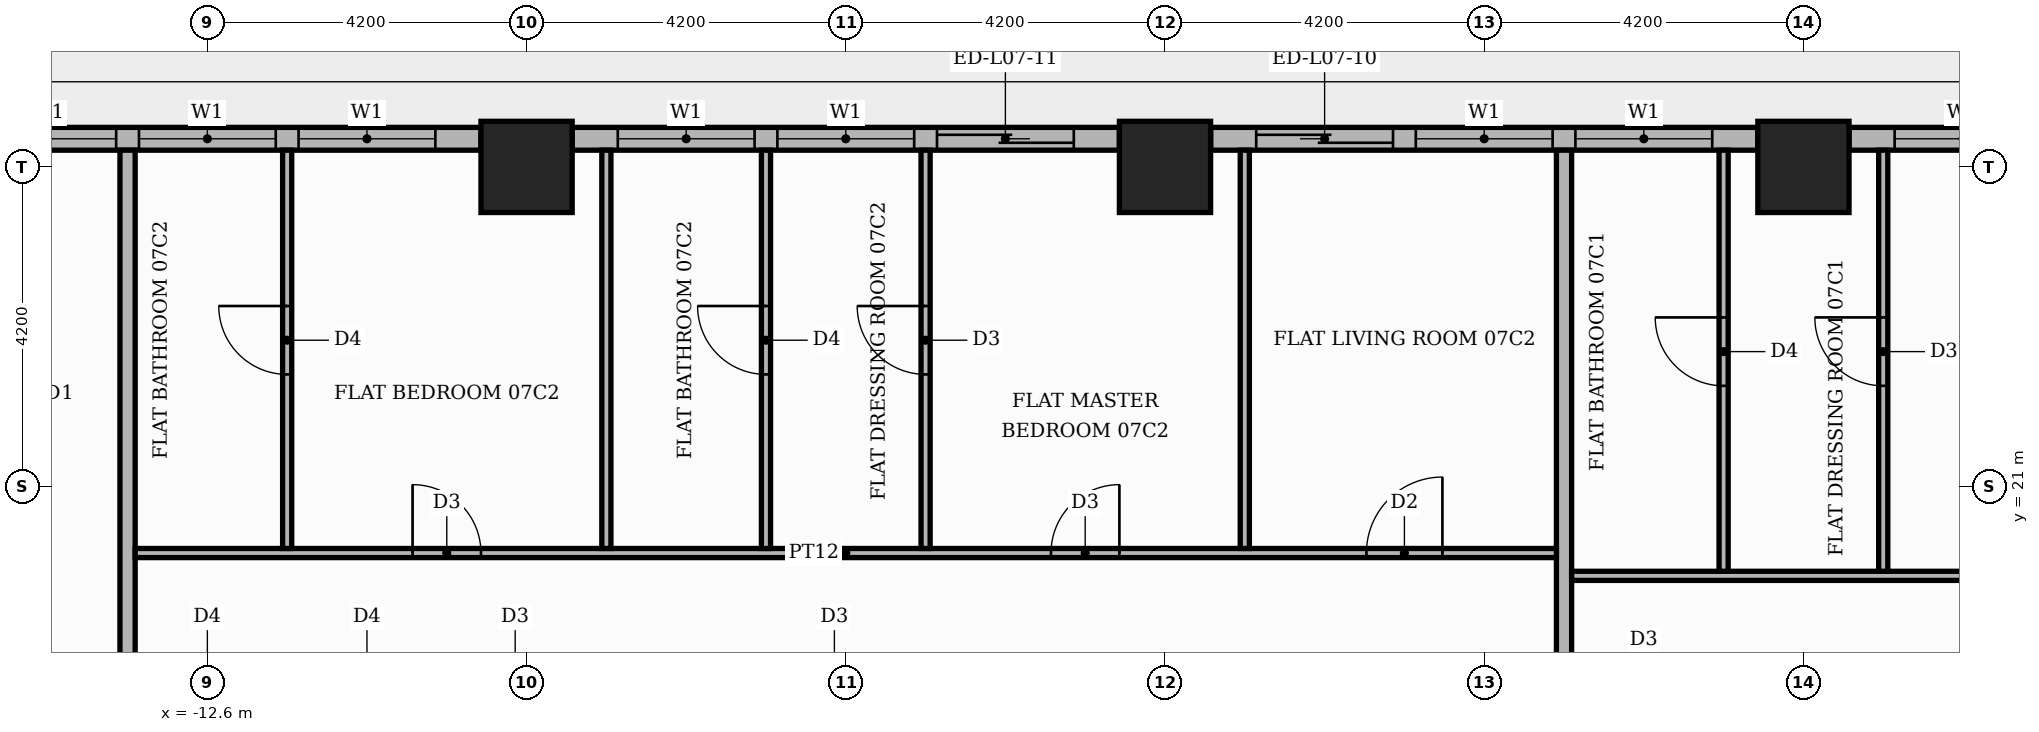
"""IFC4 building model, lengths in metres.
Left out: names, types, materials, properties, quantities, classifications, styles, units other than length and angle.
Written with IfcOpenShell. Run it as: python <this file> out.ifc"""

import sys

from ifc_helpers import new_model, si_unit, direction, frame, frame_2d, origin, origin_2d, place, context, subcontext, project, spatial, rectangle, extrude, element, fill, save


model = new_model("IFC4")
c1 = context("Model", 3, precision=1e-05, world=origin(), true_north=direction((0.0, 1.0)))
c2 = subcontext(c1, "Body", "Model", "MODEL_VIEW")
j1 = project(units=[si_unit("LENGTHUNIT", "METRE"), si_unit("PLANEANGLEUNIT", "RADIAN")], contexts=[c1])
p1 = place(None, origin())
s1 = spatial("IfcSite", under=j1, at=p1, CompositionType="ELEMENT")
p2 = place(p1, origin())
s2 = spatial("IfcBuilding", under=s1, at=p2, CompositionType="ELEMENT")
p3 = place(p2, frame((0.0, 0.0, 34.8)))
s3 = spatial("IfcBuildingStorey", under=s2, at=p3, CompositionType="ELEMENT", Elevation=34.8)
for number, where, z_axis, x_axis in (
    (1, (0.0, 25.2, 0.0), (0.0, 0.0, 1.0), (1.0, 0.0, 0.0)),
    (2, (-8.4, 25.2, 0.0), (0.0, 0.0, 1.0), (1.0, 0.0, 0.0)),
    (3, (8.4, 25.2, 0.0), (0.0, 0.0, 1.0), (1.0, 0.0, 0.0)),
):
    element("IfcColumn", number, at=place(p3, frame(where, z_axis=z_axis, x_axis=x_axis)), inside=s3, PredefinedType="COLUMN", context=c2, shape_type="SweptSolid", body=[
        extrude(rectangle(XDim=1.2, YDim=1.2, at=origin_2d()), origin(), (0.0, 0.0, 1.0), 3.9),
    ])
p4 = place(p3, frame((16.2, 25.57, 0.0), z_axis=(0.0, 0.0, 1.0), x_axis=(-1.0, 0.0, 0.0)))
e4 = element("IfcWall", 4, at=p4, inside=s3, PredefinedType="STANDARD", context=c2, shape_type="SweptSolid", body=[
    extrude(rectangle(XDim=7.2, YDim=0.3, at=frame_2d((3.6, 0.0))), origin(), (0.0, 0.0, 1.0), 3.48),
])
p5 = place(p4, frame((0.6, 0.0, 0.0)))
e5 = element("IfcOpeningElement", 5, at=p5, cuts=e4, PredefinedType="OPENING", context=c2, shape_type="SweptSolid", body=[
    extrude(rectangle(XDim=1.8, YDim=2.4, at=frame_2d((0.9, 1.2))), frame((0.0, 0.16, 0.0), z_axis=(0.0, -1.0, 0.0), x_axis=(1.0, 0.0, 0.0)), (0.0, 0.0, 1.0), 0.32),
])
p6 = place(p4, frame((2.7, 0.0, 0.0)))
e6 = element("IfcOpeningElement", 6, at=p6, cuts=e4, PredefinedType="OPENING", context=c2, shape_type="SweptSolid", body=[
    extrude(rectangle(XDim=1.8, YDim=2.4, at=frame_2d((0.9, 1.2))), frame((0.0, 0.16, 0.0), z_axis=(0.0, -1.0, 0.0), x_axis=(1.0, 0.0, 0.0)), (0.0, 0.0, 1.0), 0.32),
])
p7 = place(p4, frame((4.8, 0.0, 0.9)))
e7 = element("IfcOpeningElement", 7, at=p7, cuts=e4, PredefinedType="OPENING", context=c2, shape_type="SweptSolid", body=[
    extrude(rectangle(XDim=1.8, YDim=2.1, at=frame_2d((0.9, 1.05))), frame((0.0, 0.16, 0.0), z_axis=(0.0, -1.0, 0.0), x_axis=(1.0, 0.0, 0.0)), (0.0, 0.0, 1.0), 0.32),
])
p8 = place(p3, frame((7.8, 25.57, 0.0), z_axis=(0.0, 0.0, 1.0), x_axis=(-1.0, 0.0, 0.0)))
e8 = element("IfcWall", 8, at=p8, inside=s3, PredefinedType="STANDARD", context=c2, shape_type="SweptSolid", body=[
    extrude(rectangle(XDim=7.2, YDim=0.3, at=frame_2d((3.6, 0.0))), origin(), (0.0, 0.0, 1.0), 3.48),
])
p9 = place(p8, frame((0.6, 0.0, 0.9)))
e9 = element("IfcOpeningElement", 9, at=p9, cuts=e8, PredefinedType="OPENING", context=c2, shape_type="SweptSolid", body=[
    extrude(rectangle(XDim=1.8, YDim=2.1, at=frame_2d((0.9, 1.05))), frame((0.0, 0.16, 0.0), z_axis=(0.0, -1.0, 0.0), x_axis=(1.0, 0.0, 0.0)), (0.0, 0.0, 1.0), 0.32),
])
p10 = place(p8, frame((2.7, 0.0, 0.9)))
e10 = element("IfcOpeningElement", 10, at=p10, cuts=e8, PredefinedType="OPENING", context=c2, shape_type="SweptSolid", body=[
    extrude(rectangle(XDim=1.8, YDim=2.1, at=frame_2d((0.9, 1.05))), frame((0.0, 0.16, 0.0), z_axis=(0.0, -1.0, 0.0), x_axis=(1.0, 0.0, 0.0)), (0.0, 0.0, 1.0), 0.32),
])
p11 = place(p8, frame((4.8, 0.0, 0.0)))
e11 = element("IfcOpeningElement", 11, at=p11, cuts=e8, PredefinedType="OPENING", context=c2, shape_type="SweptSolid", body=[
    extrude(rectangle(XDim=1.8, YDim=2.4, at=frame_2d((0.9, 1.2))), frame((0.0, 0.16, 0.0), z_axis=(0.0, -1.0, 0.0), x_axis=(1.0, 0.0, 0.0)), (0.0, 0.0, 1.0), 0.32),
])
p12 = place(p3, frame((-0.6, 25.57, 0.0), z_axis=(0.0, 0.0, 1.0), x_axis=(-1.0, 0.0, 0.0)))
e12 = element("IfcWall", 12, at=p12, inside=s3, PredefinedType="STANDARD", context=c2, shape_type="SweptSolid", body=[
    extrude(rectangle(XDim=7.2, YDim=0.3, at=frame_2d((3.6, 0.0))), origin(), (0.0, 0.0, 1.0), 3.48),
])
p13 = place(p12, frame((0.6, 0.0, 0.0)))
e13 = element("IfcOpeningElement", 13, at=p13, cuts=e12, PredefinedType="OPENING", context=c2, shape_type="SweptSolid", body=[
    extrude(rectangle(XDim=1.8, YDim=2.4, at=frame_2d((0.9, 1.2))), frame((0.0, 0.16, 0.0), z_axis=(0.0, -1.0, 0.0), x_axis=(1.0, 0.0, 0.0)), (0.0, 0.0, 1.0), 0.32),
])
p14 = place(p12, frame((2.7, 0.0, 0.9)))
e14 = element("IfcOpeningElement", 14, at=p14, cuts=e12, PredefinedType="OPENING", context=c2, shape_type="SweptSolid", body=[
    extrude(rectangle(XDim=1.8, YDim=2.1, at=frame_2d((0.9, 1.05))), frame((0.0, 0.16, 0.0), z_axis=(0.0, -1.0, 0.0), x_axis=(1.0, 0.0, 0.0)), (0.0, 0.0, 1.0), 0.32),
])
p15 = place(p12, frame((4.8, 0.0, 0.9)))
e15 = element("IfcOpeningElement", 15, at=p15, cuts=e12, PredefinedType="OPENING", context=c2, shape_type="SweptSolid", body=[
    extrude(rectangle(XDim=1.8, YDim=2.1, at=frame_2d((0.9, 1.05))), frame((0.0, 0.16, 0.0), z_axis=(0.0, -1.0, 0.0), x_axis=(1.0, 0.0, 0.0)), (0.0, 0.0, 1.0), 0.32),
])
p16 = place(p3, frame((-9.0, 25.57, 0.0), z_axis=(0.0, 0.0, 1.0), x_axis=(-1.0, 0.0, 0.0)))
e16 = element("IfcWall", 16, at=p16, inside=s3, PredefinedType="STANDARD", context=c2, shape_type="SweptSolid", body=[
    extrude(rectangle(XDim=7.2, YDim=0.3, at=frame_2d((3.6, 0.0))), origin(), (0.0, 0.0, 1.0), 3.48),
])
p17 = place(p16, frame((0.6, 0.0, 0.9)))
e17 = element("IfcOpeningElement", 17, at=p17, cuts=e16, PredefinedType="OPENING", context=c2, shape_type="SweptSolid", body=[
    extrude(rectangle(XDim=1.8, YDim=2.1, at=frame_2d((0.9, 1.05))), frame((0.0, 0.16, 0.0), z_axis=(0.0, -1.0, 0.0), x_axis=(1.0, 0.0, 0.0)), (0.0, 0.0, 1.0), 0.32),
])
p18 = place(p16, frame((2.7, 0.0, 0.9)))
e18 = element("IfcOpeningElement", 18, at=p18, cuts=e16, PredefinedType="OPENING", context=c2, shape_type="SweptSolid", body=[
    extrude(rectangle(XDim=1.8, YDim=2.1, at=frame_2d((0.9, 1.05))), frame((0.0, 0.16, 0.0), z_axis=(0.0, -1.0, 0.0), x_axis=(1.0, 0.0, 0.0)), (0.0, 0.0, 1.0), 0.32),
])
p19 = place(p16, frame((4.8, 0.0, 0.9)))
e19 = element("IfcOpeningElement", 19, at=p19, cuts=e16, PredefinedType="OPENING", context=c2, shape_type="SweptSolid", body=[
    extrude(rectangle(XDim=1.8, YDim=2.1, at=frame_2d((0.9, 1.05))), frame((0.0, 0.16, 0.0), z_axis=(0.0, -1.0, 0.0), x_axis=(1.0, 0.0, 0.0)), (0.0, 0.0, 1.0), 0.32),
])
for number, where, z_axis, x_axis in (
    (20, (-13.65, 13.75, 0.0), (0.0, 0.0, 1.0), (0.0, 1.0, 0.0)),
    (21, (5.25, 13.75, 0.0), (0.0, 0.0, 1.0), (0.0, 1.0, 0.0)),
):
    element("IfcWall", number, at=place(p3, frame(where, z_axis=z_axis, x_axis=x_axis)), inside=s3, PredefinedType="PARTITIONING", context=c2, shape_type="SweptSolid", body=[
        extrude(rectangle(XDim=11.67, YDim=0.2, at=frame_2d((5.835, 0.0))), origin(), (0.0, 0.0, 1.0), 3.48),
    ])
p20 = place(p3, frame((5.35, 19.82, 0.0), z_axis=(0.0, 0.0, 1.0), x_axis=(1.0, 0.0, 0.0)))
e22 = element("IfcWall", 22, at=p20, inside=s3, PredefinedType="PARTITIONING", context=c2, shape_type="SweptSolid", body=[
    extrude(rectangle(XDim=11.95, YDim=0.12, at=frame_2d((5.975, 0.0))), origin(), (0.0, 0.0, 1.0), 3.48),
])
p21 = place(p20, frame((8.85, 0.0, 0.0)))
e23 = element("IfcOpeningElement", 23, at=p21, cuts=e22, PredefinedType="OPENING", context=c2, shape_type="SweptSolid", body=[
    extrude(rectangle(XDim=1.0, YDim=2.1, at=frame_2d((0.5, 1.05))), frame((0.0, 0.07, 0.0), z_axis=(0.0, -1.0, 0.0), x_axis=(1.0, 0.0, 0.0)), (0.0, 0.0, 1.0), 0.14),
])
p22 = place(p20, frame((5.75, 0.0, 0.0)))
e24 = element("IfcOpeningElement", 24, at=p22, cuts=e22, PredefinedType="OPENING", context=c2, shape_type="SweptSolid", body=[
    extrude(rectangle(XDim=0.9, YDim=2.1, at=frame_2d((0.45, 1.05))), frame((0.0, 0.07, 0.0), z_axis=(0.0, -1.0, 0.0), x_axis=(1.0, 0.0, 0.0)), (0.0, 0.0, 1.0), 0.14),
])
p23 = place(p3, frame((7.35, 19.88, 0.0), z_axis=(0.0, 0.0, 1.0), x_axis=(0.0, 1.0, 0.0)))
e25 = element("IfcWall", 25, at=p23, inside=s3, PredefinedType="PARTITIONING", context=c2, shape_type="SweptSolid", body=[
    extrude(rectangle(XDim=5.54, YDim=0.12, at=frame_2d((2.77, 0.0))), origin(), (0.0, 0.0, 1.0), 3.48),
])
p24 = place(p23, frame((2.44, 0.0, 0.0)))
e26 = element("IfcOpeningElement", 26, at=p24, cuts=e25, PredefinedType="OPENING", context=c2, shape_type="SweptSolid", body=[
    extrude(rectangle(XDim=0.9, YDim=2.1, at=frame_2d((0.45, 1.05))), frame((0.0, 0.07, 0.0), z_axis=(0.0, -1.0, 0.0), x_axis=(1.0, 0.0, 0.0)), (0.0, 0.0, 1.0), 0.14),
])
p25 = place(p3, frame((9.45, 19.88, 0.0), z_axis=(0.0, 0.0, 1.0), x_axis=(0.0, 1.0, 0.0)))
e27 = element("IfcWall", 27, at=p25, inside=s3, PredefinedType="PARTITIONING", context=c2, shape_type="SweptSolid", body=[
    extrude(rectangle(XDim=5.54, YDim=0.12, at=frame_2d((2.77, 0.0))), origin(), (0.0, 0.0, 1.0), 3.48),
])
p26 = place(p25, frame((2.44, 0.0, 0.0)))
e28 = element("IfcOpeningElement", 28, at=p26, cuts=e27, PredefinedType="OPENING", context=c2, shape_type="SweptSolid", body=[
    extrude(rectangle(XDim=0.9, YDim=2.1, at=frame_2d((0.45, 1.05))), frame((0.0, 0.07, 0.0), z_axis=(0.0, -1.0, 0.0), x_axis=(1.0, 0.0, 0.0)), (0.0, 0.0, 1.0), 0.14),
])
p27 = place(p3, frame((-13.55, 20.12, 0.0), z_axis=(0.0, 0.0, 1.0), x_axis=(1.0, 0.0, 0.0)))
e29 = element("IfcWall", 29, at=p27, inside=s3, PredefinedType="PARTITIONING", context=c2, shape_type="SweptSolid", body=[
    extrude(rectangle(XDim=18.7, YDim=0.12, at=frame_2d((9.35, 0.0))), origin(), (0.0, 0.0, 1.0), 3.48),
])
p28 = place(p27, frame((16.2, 0.0, 0.0)))
e30 = element("IfcOpeningElement", 30, at=p28, cuts=e29, PredefinedType="OPENING", context=c2, shape_type="SweptSolid", body=[
    extrude(rectangle(XDim=1.0, YDim=2.1, at=frame_2d((0.5, 1.05))), frame((0.0, 0.07, 0.0), z_axis=(0.0, -1.0, 0.0), x_axis=(1.0, 0.0, 0.0)), (0.0, 0.0, 1.0), 0.14),
])
p29 = place(p27, frame((12.05, 0.0, 0.0)))
e31 = element("IfcOpeningElement", 31, at=p29, cuts=e29, PredefinedType="OPENING", context=c2, shape_type="SweptSolid", body=[
    extrude(rectangle(XDim=0.9, YDim=2.1, at=frame_2d((0.45, 1.05))), frame((0.0, 0.07, 0.0), z_axis=(0.0, -1.0, 0.0), x_axis=(1.0, 0.0, 0.0)), (0.0, 0.0, 1.0), 0.14),
])
p30 = place(p27, frame((3.65, 0.0, 0.0)))
e32 = element("IfcOpeningElement", 32, at=p30, cuts=e29, PredefinedType="OPENING", context=c2, shape_type="SweptSolid", body=[
    extrude(rectangle(XDim=0.9, YDim=2.1, at=frame_2d((0.45, 1.05))), frame((0.0, 0.07, 0.0), z_axis=(0.0, -1.0, 0.0), x_axis=(1.0, 0.0, 0.0)), (0.0, 0.0, 1.0), 0.14),
])
p31 = place(p3, frame((-11.55, 20.18, 0.0), z_axis=(0.0, 0.0, 1.0), x_axis=(0.0, 1.0, 0.0)))
e33 = element("IfcWall", 33, at=p31, inside=s3, PredefinedType="PARTITIONING", context=c2, shape_type="SweptSolid", body=[
    extrude(rectangle(XDim=5.24, YDim=0.12, at=frame_2d((2.62, 0.0))), origin(), (0.0, 0.0, 1.0), 3.48),
])
p32 = place(p31, frame((2.29, 0.0, 0.0)))
e34 = element("IfcOpeningElement", 34, at=p32, cuts=e33, PredefinedType="OPENING", context=c2, shape_type="SweptSolid", body=[
    extrude(rectangle(XDim=0.9, YDim=2.1, at=frame_2d((0.45, 1.05))), frame((0.0, 0.07, 0.0), z_axis=(0.0, -1.0, 0.0), x_axis=(1.0, 0.0, 0.0)), (0.0, 0.0, 1.0), 0.14),
])
p33 = place(p3, frame((-7.35, 20.18, 0.0), z_axis=(0.0, 0.0, 1.0), x_axis=(0.0, 1.0, 0.0)))
e35 = element("IfcWall", 35, at=p33, inside=s3, PredefinedType="PARTITIONING", context=c2, shape_type="SweptSolid", body=[
    extrude(rectangle(XDim=5.24, YDim=0.12, at=frame_2d((2.62, 0.0))), origin(), (0.0, 0.0, 1.0), 3.48),
])
p34 = place(p3, frame((-5.25, 20.18, 0.0), z_axis=(0.0, 0.0, 1.0), x_axis=(0.0, 1.0, 0.0)))
e36 = element("IfcWall", 36, at=p34, inside=s3, PredefinedType="PARTITIONING", context=c2, shape_type="SweptSolid", body=[
    extrude(rectangle(XDim=5.24, YDim=0.12, at=frame_2d((2.62, 0.0))), origin(), (0.0, 0.0, 1.0), 3.48),
])
p35 = place(p34, frame((2.29, 0.0, 0.0)))
e37 = element("IfcOpeningElement", 37, at=p35, cuts=e36, PredefinedType="OPENING", context=c2, shape_type="SweptSolid", body=[
    extrude(rectangle(XDim=0.9, YDim=2.1, at=frame_2d((0.45, 1.05))), frame((0.0, 0.07, 0.0), z_axis=(0.0, -1.0, 0.0), x_axis=(1.0, 0.0, 0.0)), (0.0, 0.0, 1.0), 0.14),
])
p36 = place(p3, frame((-3.15, 20.18, 0.0), z_axis=(0.0, 0.0, 1.0), x_axis=(0.0, 1.0, 0.0)))
e38 = element("IfcWall", 38, at=p36, inside=s3, PredefinedType="PARTITIONING", context=c2, shape_type="SweptSolid", body=[
    extrude(rectangle(XDim=5.24, YDim=0.12, at=frame_2d((2.62, 0.0))), origin(), (0.0, 0.0, 1.0), 3.48),
])
p37 = place(p36, frame((2.29, 0.0, 0.0)))
e39 = element("IfcOpeningElement", 39, at=p37, cuts=e38, PredefinedType="OPENING", context=c2, shape_type="SweptSolid", body=[
    extrude(rectangle(XDim=0.9, YDim=2.1, at=frame_2d((0.45, 1.05))), frame((0.0, 0.07, 0.0), z_axis=(0.0, -1.0, 0.0), x_axis=(1.0, 0.0, 0.0)), (0.0, 0.0, 1.0), 0.14),
])
p38 = place(p3, frame((1.05, 20.18, 0.0), z_axis=(0.0, 0.0, 1.0), x_axis=(0.0, 1.0, 0.0)))
e40 = element("IfcWall", 40, at=p38, inside=s3, PredefinedType="PARTITIONING", context=c2, shape_type="SweptSolid", body=[
    extrude(rectangle(XDim=5.24, YDim=0.12, at=frame_2d((2.62, 0.0))), origin(), (0.0, 0.0, 1.0), 3.48),
])
p39 = place(p7, origin())
e41 = element("IfcWindow", 41, at=p39, inside=s3, PartitioningType="SINGLE_PANEL", PredefinedType="WINDOW", context=c2, shape_type="SweptSolid", body=[
    extrude(rectangle(XDim=1.8, YDim=2.1, at=frame_2d((0.9, 1.05))), frame((0.0, 0.03, 0.0), z_axis=(0.0, -1.0, 0.0), x_axis=(1.0, 0.0, 0.0)), (0.0, 0.0, 1.0), 0.06),
])
fill(e7, e41)
p40 = place(p9, origin())
e42 = element("IfcWindow", 42, at=p40, inside=s3, PartitioningType="SINGLE_PANEL", PredefinedType="WINDOW", context=c2, shape_type="SweptSolid", body=[
    extrude(rectangle(XDim=1.8, YDim=2.1, at=frame_2d((0.9, 1.05))), frame((0.0, 0.03, 0.0), z_axis=(0.0, -1.0, 0.0), x_axis=(1.0, 0.0, 0.0)), (0.0, 0.0, 1.0), 0.06),
])
fill(e9, e42)
p41 = place(p10, origin())
e43 = element("IfcWindow", 43, at=p41, inside=s3, PartitioningType="SINGLE_PANEL", PredefinedType="WINDOW", context=c2, shape_type="SweptSolid", body=[
    extrude(rectangle(XDim=1.8, YDim=2.1, at=frame_2d((0.9, 1.05))), frame((0.0, 0.03, 0.0), z_axis=(0.0, -1.0, 0.0), x_axis=(1.0, 0.0, 0.0)), (0.0, 0.0, 1.0), 0.06),
])
fill(e10, e43)
p42 = place(p11, origin())
e44 = element("IfcDoor", 44, at=p42, inside=s3, OperationType="SLIDING_TO_RIGHT", PredefinedType="DOOR", context=c2, shape_type="SweptSolid", body=[
    extrude(rectangle(XDim=1.8, YDim=2.4, at=frame_2d((0.9, 1.2))), frame((0.0, 0.025, 0.0), z_axis=(0.0, -1.0, 0.0), x_axis=(1.0, 0.0, 0.0)), (0.0, 0.0, 1.0), 0.05),
])
fill(e11, e44)
p43 = place(p13, origin())
e45 = element("IfcDoor", 45, at=p43, inside=s3, OperationType="SLIDING_TO_LEFT", PredefinedType="DOOR", context=c2, shape_type="SweptSolid", body=[
    extrude(rectangle(XDim=1.8, YDim=2.4, at=frame_2d((0.9, 1.2))), frame((0.0, 0.025, 0.0), z_axis=(0.0, -1.0, 0.0), x_axis=(1.0, 0.0, 0.0)), (0.0, 0.0, 1.0), 0.05),
])
fill(e13, e45)
p44 = place(p14, origin())
e46 = element("IfcWindow", 46, at=p44, inside=s3, PartitioningType="SINGLE_PANEL", PredefinedType="WINDOW", context=c2, shape_type="SweptSolid", body=[
    extrude(rectangle(XDim=1.8, YDim=2.1, at=frame_2d((0.9, 1.05))), frame((0.0, 0.03, 0.0), z_axis=(0.0, -1.0, 0.0), x_axis=(1.0, 0.0, 0.0)), (0.0, 0.0, 1.0), 0.06),
])
fill(e14, e46)
p45 = place(p15, origin())
e47 = element("IfcWindow", 47, at=p45, inside=s3, PartitioningType="SINGLE_PANEL", PredefinedType="WINDOW", context=c2, shape_type="SweptSolid", body=[
    extrude(rectangle(XDim=1.8, YDim=2.1, at=frame_2d((0.9, 1.05))), frame((0.0, 0.03, 0.0), z_axis=(0.0, -1.0, 0.0), x_axis=(1.0, 0.0, 0.0)), (0.0, 0.0, 1.0), 0.06),
])
fill(e15, e47)
p46 = place(p17, origin())
e48 = element("IfcWindow", 48, at=p46, inside=s3, PartitioningType="SINGLE_PANEL", PredefinedType="WINDOW", context=c2, shape_type="SweptSolid", body=[
    extrude(rectangle(XDim=1.8, YDim=2.1, at=frame_2d((0.9, 1.05))), frame((0.0, 0.03, 0.0), z_axis=(0.0, -1.0, 0.0), x_axis=(1.0, 0.0, 0.0)), (0.0, 0.0, 1.0), 0.06),
])
fill(e17, e48)
p47 = place(p18, origin())
e49 = element("IfcWindow", 49, at=p47, inside=s3, PartitioningType="SINGLE_PANEL", PredefinedType="WINDOW", context=c2, shape_type="SweptSolid", body=[
    extrude(rectangle(XDim=1.8, YDim=2.1, at=frame_2d((0.9, 1.05))), frame((0.0, 0.03, 0.0), z_axis=(0.0, -1.0, 0.0), x_axis=(1.0, 0.0, 0.0)), (0.0, 0.0, 1.0), 0.06),
])
fill(e18, e49)
p48 = place(p19, origin())
e50 = element("IfcWindow", 50, at=p48, inside=s3, PartitioningType="SINGLE_PANEL", PredefinedType="WINDOW", context=c2, shape_type="SweptSolid", body=[
    extrude(rectangle(XDim=1.8, YDim=2.1, at=frame_2d((0.9, 1.05))), frame((0.0, 0.03, 0.0), z_axis=(0.0, -1.0, 0.0), x_axis=(1.0, 0.0, 0.0)), (0.0, 0.0, 1.0), 0.06),
])
fill(e19, e50)
p49 = place(p26, origin())
e51 = element("IfcDoor", 51, at=p49, inside=s3, OperationType="SINGLE_SWING_RIGHT", PredefinedType="DOOR", context=c2, shape_type="SweptSolid", body=[
    extrude(rectangle(XDim=0.9, YDim=2.1, at=frame_2d((0.45, 1.05))), frame((0.0, 0.025, 0.0), z_axis=(0.0, -1.0, 0.0), x_axis=(1.0, 0.0, 0.0)), (0.0, 0.0, 1.0), 0.05),
])
fill(e28, e51)
p50 = place(p24, origin())
e52 = element("IfcDoor", 52, at=p50, inside=s3, OperationType="SINGLE_SWING_RIGHT", PredefinedType="DOOR", context=c2, shape_type="SweptSolid", body=[
    extrude(rectangle(XDim=0.9, YDim=2.1, at=frame_2d((0.45, 1.05))), frame((0.0, 0.025, 0.0), z_axis=(0.0, -1.0, 0.0), x_axis=(1.0, 0.0, 0.0)), (0.0, 0.0, 1.0), 0.05),
])
fill(e26, e52)
p51 = place(p28, origin())
e53 = element("IfcDoor", 53, at=p51, inside=s3, OperationType="SINGLE_SWING_RIGHT", PredefinedType="DOOR", context=c2, shape_type="SweptSolid", body=[
    extrude(rectangle(XDim=1.0, YDim=2.1, at=frame_2d((0.5, 1.05))), frame((0.0, 0.025, 0.0), z_axis=(0.0, -1.0, 0.0), x_axis=(1.0, 0.0, 0.0)), (0.0, 0.0, 1.0), 0.05),
])
fill(e30, e53)
p52 = place(p29, origin())
e54 = element("IfcDoor", 54, at=p52, inside=s3, OperationType="SINGLE_SWING_RIGHT", PredefinedType="DOOR", context=c2, shape_type="SweptSolid", body=[
    extrude(rectangle(XDim=0.9, YDim=2.1, at=frame_2d((0.45, 1.05))), frame((0.0, 0.025, 0.0), z_axis=(0.0, -1.0, 0.0), x_axis=(1.0, 0.0, 0.0)), (0.0, 0.0, 1.0), 0.05),
])
fill(e31, e54)
p53 = place(p37, origin())
e55 = element("IfcDoor", 55, at=p53, inside=s3, OperationType="SINGLE_SWING_RIGHT", PredefinedType="DOOR", context=c2, shape_type="SweptSolid", body=[
    extrude(rectangle(XDim=0.9, YDim=2.1, at=frame_2d((0.45, 1.05))), frame((0.0, 0.025, 0.0), z_axis=(0.0, -1.0, 0.0), x_axis=(1.0, 0.0, 0.0)), (0.0, 0.0, 1.0), 0.05),
])
fill(e39, e55)
p54 = place(p35, origin())
e56 = element("IfcDoor", 56, at=p54, inside=s3, OperationType="SINGLE_SWING_RIGHT", PredefinedType="DOOR", context=c2, shape_type="SweptSolid", body=[
    extrude(rectangle(XDim=0.9, YDim=2.1, at=frame_2d((0.45, 1.05))), frame((0.0, 0.025, 0.0), z_axis=(0.0, -1.0, 0.0), x_axis=(1.0, 0.0, 0.0)), (0.0, 0.0, 1.0), 0.05),
])
fill(e37, e56)
p55 = place(p30, origin())
e57 = element("IfcDoor", 57, at=p55, inside=s3, OperationType="SINGLE_SWING_LEFT", PredefinedType="DOOR", context=c2, shape_type="SweptSolid", body=[
    extrude(rectangle(XDim=0.9, YDim=2.1, at=frame_2d((0.45, 1.05))), frame((0.0, 0.025, 0.0), z_axis=(0.0, -1.0, 0.0), x_axis=(1.0, 0.0, 0.0)), (0.0, 0.0, 1.0), 0.05),
])
fill(e32, e57)
p56 = place(p32, origin())
e58 = element("IfcDoor", 58, at=p56, inside=s3, OperationType="SINGLE_SWING_RIGHT", PredefinedType="DOOR", context=c2, shape_type="SweptSolid", body=[
    extrude(rectangle(XDim=0.9, YDim=2.1, at=frame_2d((0.45, 1.05))), frame((0.0, 0.025, 0.0), z_axis=(0.0, -1.0, 0.0), x_axis=(1.0, 0.0, 0.0)), (0.0, 0.0, 1.0), 0.05),
])
fill(e34, e58)
save(model, sys.argv[1])
